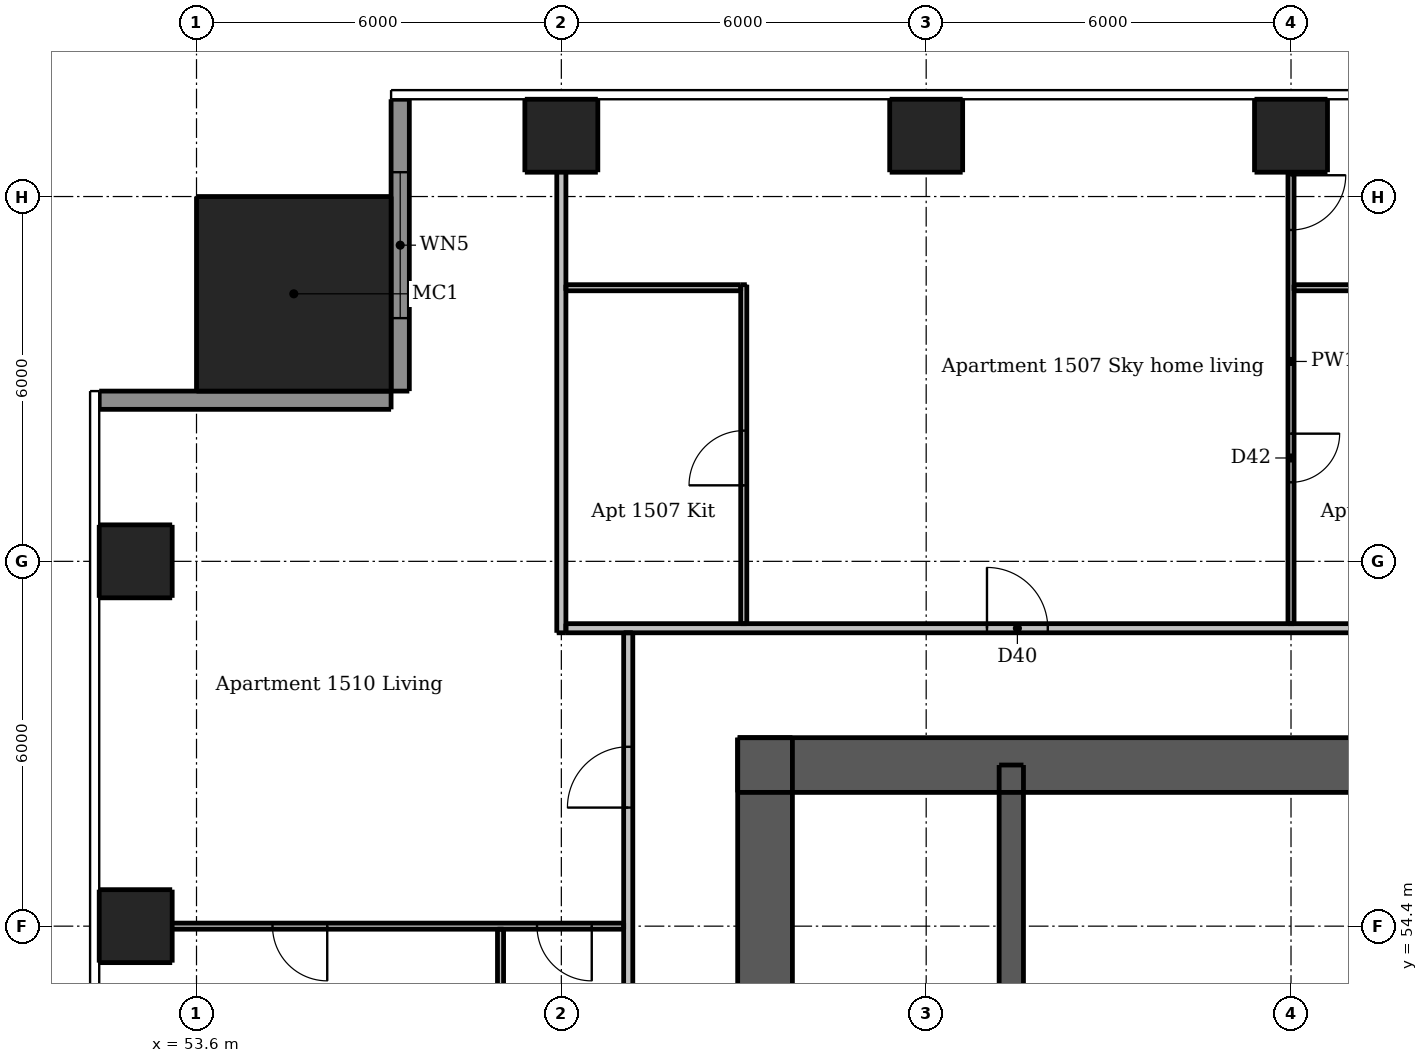
"""IFC4 building model, lengths in metres.
Left out: names, types, materials, properties, quantities, classifications, styles, units other than length and angle.
Written with IfcOpenShell. Run it as: python <this file> out.ifc"""

import sys

from ifc_helpers import new_model, si_unit, direction, frame, frame_2d, origin, origin_2d, place, context, subcontext, project, spatial, rectangle, extrude, element, fill, save


model = new_model("IFC4")
c1 = context("Model", 3, precision=1e-05, world=origin(), true_north=direction((0.0, 1.0)))
c2 = subcontext(c1, "Body", "Model", "MODEL_VIEW")
j1 = project(units=[si_unit("LENGTHUNIT", "METRE"), si_unit("PLANEANGLEUNIT", "RADIAN")], contexts=[c1])
p1 = place(None, origin())
s1 = spatial("IfcSite", under=j1, at=p1, CompositionType="ELEMENT")
p2 = place(p1, origin())
s2 = spatial("IfcBuilding", under=s1, at=p2, CompositionType="ELEMENT")
p3 = place(p2, frame((0.0, 0.0, 56.5)))
s3 = spatial("IfcBuildingStorey", under=s2, at=p3, CompositionType="ELEMENT", Elevation=56.5)
p4 = place(p3, frame((62.5, 57.05, 0.0), z_axis=(0.0, 0.0, 1.0), x_axis=(1.0, 0.0, 0.0)))
e1 = element("IfcWall", 1, at=p4, inside=s3, PredefinedType="SHEAR", context=c2, shape_type="SweptSolid", body=[
    extrude(rectangle(XDim=24.0, YDim=0.9, at=frame_2d((12.0, 0.0))), origin(), (0.0, 0.0, 1.0), 3.05),
])
p5 = place(p4, frame((20.85, 0.0, 0.0)))
e2 = element("IfcOpeningElement", 2, at=p5, cuts=e1, PredefinedType="OPENING", context=c2, shape_type="SweptSolid", body=[
    extrude(rectangle(XDim=1.1, YDim=2.1, at=frame_2d((0.55, 1.05))), frame((0.0, 0.46, 0.0), z_axis=(0.0, -1.0, 0.0), x_axis=(1.0, 0.0, 0.0)), (0.0, 0.0, 1.0), 0.92),
])
p6 = place(p4, frame((2.05, 0.0, 0.0)))
e3 = element("IfcOpeningElement", 3, at=p6, cuts=e1, PredefinedType="OPENING", context=c2, shape_type="SweptSolid", body=[
    extrude(rectangle(XDim=1.1, YDim=2.1, at=frame_2d((0.55, 1.05))), frame((0.0, 0.46, 0.0), z_axis=(0.0, -1.0, 0.0), x_axis=(1.0, 0.0, 0.0)), (0.0, 0.0, 1.0), 0.92),
])
p7 = place(p4, frame((11.55, 0.0, 0.0)))
e4 = element("IfcOpeningElement", 4, at=p7, cuts=e1, PredefinedType="OPENING", context=c2, shape_type="SweptSolid", body=[
    extrude(rectangle(XDim=0.9, YDim=2.1, at=frame_2d((0.45, 1.05))), frame((0.0, 0.46, 0.0), z_axis=(0.0, -1.0, 0.0), x_axis=(1.0, 0.0, 0.0)), (0.0, 0.0, 1.0), 0.92),
])
p8 = place(p3, frame((62.95, 33.5, 0.0), z_axis=(0.0, 0.0, 1.0), x_axis=(0.0, 1.0, 0.0)))
e5 = element("IfcWall", 5, at=p8, inside=s3, PredefinedType="SHEAR", context=c2, shape_type="SweptSolid", body=[
    extrude(rectangle(XDim=24.0, YDim=0.9, at=frame_2d((12.0, 0.0))), origin(), (0.0, 0.0, 1.0), 3.05),
])
p9 = place(p8, frame((11.2, 0.0, 0.0)))
e6 = element("IfcOpeningElement", 6, at=p9, cuts=e5, PredefinedType="OPENING", context=c2, shape_type="SweptSolid", body=[
    extrude(rectangle(XDim=1.6, YDim=2.1, at=frame_2d((0.8, 1.05))), frame((0.0, 0.46, 0.0), z_axis=(0.0, -1.0, 0.0), x_axis=(1.0, 0.0, 0.0)), (0.0, 0.0, 1.0), 0.92),
])
p10 = place(p3, frame((67.0, 47.1, 0.0), z_axis=(0.0, 0.0, 1.0), x_axis=(0.0, 1.0, 0.0)))
e7 = element("IfcWall", 7, at=p10, inside=s3, PredefinedType="SHEAR", context=c2, shape_type="SweptSolid", body=[
    extrude(rectangle(XDim=9.95, YDim=0.4, at=frame_2d((4.975, 0.0))), origin(), (0.0, 0.0, 1.0), 3.05),
])
for number, where, z_axis, x_axis in (
    (8, (59.6, 67.4, 0.0), (0.0, 0.0, 1.0), (1.0, 0.0, 0.0)),
    (9, (65.6, 67.4, 0.0), (0.0, 0.0, 1.0), (1.0, 0.0, 0.0)),
    (10, (71.6, 67.4, 0.0), (0.0, 0.0, 1.0), (1.0, 0.0, 0.0)),
    (11, (52.6, 54.4, 0.0), (0.0, 0.0, 1.0), (1.0, 0.0, 0.0)),
    (12, (52.6, 60.4, 0.0), (0.0, 0.0, 1.0), (1.0, 0.0, 0.0)),
):
    element("IfcColumn", number, at=place(p3, frame(where, z_axis=z_axis, x_axis=x_axis)), inside=s3, PredefinedType="COLUMN", context=c2, shape_type="SweptSolid", body=[
        extrude(rectangle(XDim=1.2, YDim=1.2, at=origin_2d()), origin(), (0.0, 0.0, 1.0), 3.05),
    ])
p11 = place(p3, frame((55.2, 64.8, 0.0), z_axis=(0.0, 0.0, 1.0), x_axis=(1.0, 0.0, 0.0)))
e13 = element("IfcColumn", 13, at=p11, inside=s3, PredefinedType="COLUMN", context=c2, shape_type="SweptSolid", body=[
    extrude(rectangle(XDim=3.2, YDim=3.2, at=origin_2d()), origin(), (0.0, 0.0, 1.0), 3.3),
])
p12 = place(p3, frame((56.95, 68.0, 0.0), z_axis=(0.0, 0.0, 1.0), x_axis=(0.0, -1.0, 0.0)))
e14 = element("IfcWall", 14, at=p12, inside=s3, PredefinedType="SOLIDWALL", context=c2, shape_type="SweptSolid", body=[
    extrude(rectangle(XDim=4.8, YDim=0.3, at=frame_2d((2.4, 0.0))), origin(), (0.0, 0.0, 1.0), 3.05),
])
p13 = place(p12, frame((1.2, 0.0, 0.15)))
e15 = element("IfcOpeningElement", 15, at=p13, cuts=e14, PredefinedType="OPENING", context=c2, shape_type="SweptSolid", body=[
    extrude(rectangle(XDim=2.4, YDim=2.1, at=frame_2d((1.2, 1.05))), frame((0.0, 0.16, 0.0), z_axis=(0.0, -1.0, 0.0), x_axis=(1.0, 0.0, 0.0)), (0.0, 0.0, 1.0), 0.32),
])
p14 = place(p3, frame((56.8, 63.05, 0.0), z_axis=(0.0, 0.0, 1.0), x_axis=(-1.0, 0.0, 0.0)))
e16 = element("IfcWall", 16, at=p14, inside=s3, PredefinedType="SOLIDWALL", context=c2, shape_type="SweptSolid", body=[
    extrude(rectangle(XDim=4.8, YDim=0.3, at=frame_2d((2.4, 0.0))), origin(), (0.0, 0.0, 1.0), 3.05),
])
p15 = place(p3, frame((58.6, 54.35, 0.0), z_axis=(0.0, 0.0, 1.0), x_axis=(0.0, -1.0, 0.0)))
e17 = element("IfcWall", 17, at=p15, inside=s3, PredefinedType="PARTITIONING", context=c2, shape_type="SweptSolid", body=[
    extrude(rectangle(XDim=5.875, YDim=0.1, at=frame_2d((2.938, 0.0))), origin(), (0.0, 0.0, 1.0), 3.05),
])
p16 = place(p15, frame((3.75, 0.0, 0.0)))
e18 = element("IfcOpeningElement", 18, at=p16, cuts=e17, PredefinedType="OPENING", context=c2, shape_type="SweptSolid", body=[
    extrude(rectangle(XDim=0.8, YDim=2.1, at=frame_2d((0.4, 1.05))), frame((0.0, 0.06, 0.0), z_axis=(0.0, -1.0, 0.0), x_axis=(1.0, 0.0, 0.0)), (0.0, 0.0, 1.0), 0.12),
])
p17 = place(p3, frame((62.6, 59.375, 0.0), z_axis=(0.0, 0.0, 1.0), x_axis=(0.0, 1.0, 0.0)))
e19 = element("IfcWall", 19, at=p17, inside=s3, PredefinedType="PARTITIONING", context=c2, shape_type="SweptSolid", body=[
    extrude(rectangle(XDim=5.575, YDim=0.1, at=frame_2d((2.788, 0.0))), origin(), (0.0, 0.0, 1.0), 3.05),
])
p18 = place(p17, frame((2.275, 0.0, 0.0)))
e20 = element("IfcOpeningElement", 20, at=p18, cuts=e19, PredefinedType="OPENING", context=c2, shape_type="SweptSolid", body=[
    extrude(rectangle(XDim=0.9, YDim=2.1, at=frame_2d((0.45, 1.05))), frame((0.0, 0.06, 0.0), z_axis=(0.0, -1.0, 0.0), x_axis=(1.0, 0.0, 0.0)), (0.0, 0.0, 1.0), 0.12),
])
p19 = place(p3, frame((71.6, 68.0, 0.0), z_axis=(0.0, 0.0, 1.0), x_axis=(0.0, -1.0, 0.0)))
e21 = element("IfcWall", 21, at=p19, inside=s3, PredefinedType="PARTITIONING", context=c2, shape_type="SweptSolid", body=[
    extrude(rectangle(XDim=8.625, YDim=0.1, at=frame_2d((4.312, 0.0))), origin(), (0.0, 0.0, 1.0), 2.516),
])
p20 = place(p19, frame((1.25, 0.0, 0.0)))
e22 = element("IfcOpeningElement", 22, at=p20, cuts=e21, PredefinedType="OPENING", context=c2, shape_type="SweptSolid", body=[
    extrude(rectangle(XDim=0.9, YDim=2.1, at=frame_2d((0.45, 1.05))), frame((0.0, 0.06, 0.0), z_axis=(0.0, -1.0, 0.0), x_axis=(1.0, 0.0, 0.0)), (0.0, 0.0, 1.0), 0.12),
])
p21 = place(p19, frame((5.5, 0.0, 0.0)))
e23 = element("IfcOpeningElement", 23, at=p21, cuts=e21, PredefinedType="OPENING", context=c2, shape_type="SweptSolid", body=[
    extrude(rectangle(XDim=0.8, YDim=2.1, at=frame_2d((0.4, 1.05))), frame((0.0, 0.06, 0.0), z_axis=(0.0, -1.0, 0.0), x_axis=(1.0, 0.0, 0.0)), (0.0, 0.0, 1.0), 0.12),
])
p22 = place(p3, frame((59.675, 64.9, 0.0), z_axis=(0.0, 0.0, 1.0), x_axis=(1.0, 0.0, 0.0)))
e24 = element("IfcWall", 24, at=p22, inside=s3, PredefinedType="PARTITIONING", context=c2, shape_type="SweptSolid", body=[
    extrude(rectangle(XDim=2.875, YDim=0.1, at=frame_2d((1.438, 0.0))), origin(), (0.0, 0.0, 1.0), 3.05),
])
p23 = place(p3, frame((71.65, 64.9, 0.0), z_axis=(0.0, 0.0, 1.0), x_axis=(1.0, 0.0, 0.0)))
e25 = element("IfcWall", 25, at=p23, inside=s3, PredefinedType="PARTITIONING", context=c2, shape_type="SweptSolid", body=[
    extrude(rectangle(XDim=3.5, YDim=0.1, at=frame_2d((1.75, 0.0))), origin(), (0.0, 0.0, 1.0), 3.05),
])
p24 = place(p3, frame((60.625, 54.4, 0.0), z_axis=(0.0, 0.0, 1.0), x_axis=(-1.0, 0.0, 0.0)))
e26 = element("IfcWall", 26, at=p24, inside=s3, PredefinedType="PARTITIONING", context=c2, shape_type="SweptSolid", body=[
    extrude(rectangle(XDim=8.625, YDim=0.1, at=frame_2d((4.312, 0.0))), origin(), (0.0, 0.0, 1.0), 2.516),
])
p25 = place(p24, frame((0.525, 0.0, 0.0)))
e27 = element("IfcOpeningElement", 27, at=p25, cuts=e26, PredefinedType="OPENING", context=c2, shape_type="SweptSolid", body=[
    extrude(rectangle(XDim=0.9, YDim=2.1, at=frame_2d((0.45, 1.05))), frame((0.0, 0.06, 0.0), z_axis=(0.0, -1.0, 0.0), x_axis=(1.0, 0.0, 0.0)), (0.0, 0.0, 1.0), 0.12),
])
p26 = place(p24, frame((4.875, 0.0, 0.0)))
e28 = element("IfcOpeningElement", 28, at=p26, cuts=e26, PredefinedType="OPENING", context=c2, shape_type="SweptSolid", body=[
    extrude(rectangle(XDim=0.9, YDim=2.1, at=frame_2d((0.45, 1.05))), frame((0.0, 0.06, 0.0), z_axis=(0.0, -1.0, 0.0), x_axis=(1.0, 0.0, 0.0)), (0.0, 0.0, 1.0), 0.12),
])
p27 = place(p3, frame((59.6, 59.225, 0.0), z_axis=(0.0, 0.0, 1.0), x_axis=(0.0, 1.0, 0.0)))
e29 = element("IfcWall", 29, at=p27, inside=s3, PredefinedType="PARTITIONING", context=c2, shape_type="SweptSolid", body=[
    extrude(rectangle(XDim=8.775, YDim=0.15, at=frame_2d((4.387, 0.0))), origin(), (0.0, 0.0, 1.0), 2.51),
])
p28 = place(p3, frame((60.7, 30.325, 0.0), z_axis=(0.0, 0.0, 1.0), x_axis=(0.0, 1.0, 0.0)))
e30 = element("IfcWall", 30, at=p28, inside=s3, PredefinedType="PARTITIONING", context=c2, shape_type="SweptSolid", body=[
    extrude(rectangle(XDim=28.9, YDim=0.15, at=frame_2d((14.45, 0.0))), origin(), (0.0, 0.0, 1.0), 3.05),
])
p29 = place(p28, frame((9.225, 0.0, 0.0)))
e31 = element("IfcOpeningElement", 31, at=p29, cuts=e30, PredefinedType="OPENING", context=c2, shape_type="SweptSolid", body=[
    extrude(rectangle(XDim=1.0, YDim=2.1, at=frame_2d((0.5, 1.05))), frame((0.0, 0.085, 0.0), z_axis=(0.0, -1.0, 0.0), x_axis=(1.0, 0.0, 0.0)), (0.0, 0.0, 1.0), 0.17),
])
p30 = place(p28, frame((26.025, 0.0, 0.0)))
e32 = element("IfcOpeningElement", 32, at=p30, cuts=e30, PredefinedType="OPENING", context=c2, shape_type="SweptSolid", body=[
    extrude(rectangle(XDim=1.0, YDim=2.1, at=frame_2d((0.5, 1.05))), frame((0.0, 0.085, 0.0), z_axis=(0.0, -1.0, 0.0), x_axis=(1.0, 0.0, 0.0)), (0.0, 0.0, 1.0), 0.17),
])
p31 = place(p3, frame((59.675, 59.3, 0.0), z_axis=(0.0, 0.0, 1.0), x_axis=(1.0, 0.0, 0.0)))
e33 = element("IfcWall", 33, at=p31, inside=s3, PredefinedType="PARTITIONING", context=c2, shape_type="SweptSolid", body=[
    extrude(rectangle(XDim=28.55, YDim=0.15, at=frame_2d((14.275, 0.0))), origin(), (0.0, 0.0, 1.0), 3.05),
])
p32 = place(p31, frame((6.925, 0.0, 0.0)))
e34 = element("IfcOpeningElement", 34, at=p32, cuts=e33, PredefinedType="OPENING", context=c2, shape_type="SweptSolid", body=[
    extrude(rectangle(XDim=1.0, YDim=2.1, at=frame_2d((0.5, 1.05))), frame((0.0, 0.085, 0.0), z_axis=(0.0, -1.0, 0.0), x_axis=(1.0, 0.0, 0.0)), (0.0, 0.0, 1.0), 0.17),
])
p33 = place(p31, frame((25.775, 0.0, 0.0)))
e35 = element("IfcOpeningElement", 35, at=p33, cuts=e33, PredefinedType="OPENING", context=c2, shape_type="SweptSolid", body=[
    extrude(rectangle(XDim=1.0, YDim=2.1, at=frame_2d((0.5, 1.05))), frame((0.0, 0.085, 0.0), z_axis=(0.0, -1.0, 0.0), x_axis=(1.0, 0.0, 0.0)), (0.0, 0.0, 1.0), 0.17),
])
p34 = place(p13, origin())
e36 = element("IfcWindow", 36, at=p34, inside=s3, PartitioningType="DOUBLE_PANEL_VERTICAL", PredefinedType="WINDOW", context=c2, shape_type="SweptSolid", body=[
    extrude(rectangle(XDim=2.4, YDim=2.1, at=frame_2d((1.2, 1.05))), frame((0.0, 0.03, 0.0), z_axis=(0.0, -1.0, 0.0), x_axis=(1.0, 0.0, 0.0)), (0.0, 0.0, 1.0), 0.06),
])
fill(e15, e36)
p35 = place(p6, origin())
e37 = element("IfcDoor", 37, at=p35, inside=s3, OperationType="SINGLE_SWING_LEFT", PredefinedType="DOOR", context=c2, shape_type="SweptSolid", body=[
    extrude(rectangle(XDim=1.1, YDim=2.1, at=frame_2d((0.55, 1.05))), frame((0.0, -0.388, 0.0), z_axis=(0.0, -1.0, 0.0), x_axis=(1.0, 0.0, 0.0)), (0.0, 0.0, 1.0), 0.05),
])
fill(e3, e37)
p36 = place(p32, origin())
e38 = element("IfcDoor", 38, at=p36, inside=s3, OperationType="SINGLE_SWING_LEFT", PredefinedType="DOOR", context=c2, shape_type="SweptSolid", body=[
    extrude(rectangle(XDim=1.0, YDim=2.1, at=frame_2d((0.5, 1.05))), frame((0.0, 0.025, 0.0), z_axis=(0.0, -1.0, 0.0), x_axis=(1.0, 0.0, 0.0)), (0.0, 0.0, 1.0), 0.05),
])
fill(e34, e38)
p37 = place(p18, origin())
e39 = element("IfcDoor", 39, at=p37, inside=s3, OperationType="SINGLE_SWING_LEFT", PredefinedType="DOOR", context=c2, shape_type="SweptSolid", body=[
    extrude(rectangle(XDim=0.9, YDim=2.1, at=frame_2d((0.45, 1.05))), frame((0.0, 0.025, 0.0), z_axis=(0.0, -1.0, 0.0), x_axis=(1.0, 0.0, 0.0)), (0.0, 0.0, 1.0), 0.05),
])
fill(e20, e39)
p38 = place(p20, origin())
e40 = element("IfcDoor", 40, at=p38, inside=s3, OperationType="SINGLE_SWING_LEFT", PredefinedType="DOOR", context=c2, shape_type="SweptSolid", body=[
    extrude(rectangle(XDim=0.9, YDim=2.1, at=frame_2d((0.45, 1.05))), frame((0.0, 0.025, 0.0), z_axis=(0.0, -1.0, 0.0), x_axis=(1.0, 0.0, 0.0)), (0.0, 0.0, 1.0), 0.05),
])
fill(e22, e40)
p39 = place(p21, origin())
e41 = element("IfcDoor", 41, at=p39, inside=s3, OperationType="SINGLE_SWING_LEFT", PredefinedType="DOOR", context=c2, shape_type="SweptSolid", body=[
    extrude(rectangle(XDim=0.8, YDim=2.1, at=frame_2d((0.4, 1.05))), frame((0.0, 0.025, 0.0), z_axis=(0.0, -1.0, 0.0), x_axis=(1.0, 0.0, 0.0)), (0.0, 0.0, 1.0), 0.05),
])
fill(e23, e41)
p40 = place(p30, origin())
e42 = element("IfcDoor", 42, at=p40, inside=s3, OperationType="SINGLE_SWING_LEFT", PredefinedType="DOOR", context=c2, shape_type="SweptSolid", body=[
    extrude(rectangle(XDim=1.0, YDim=2.1, at=frame_2d((0.5, 1.05))), frame((0.0, 0.025, 0.0), z_axis=(0.0, -1.0, 0.0), x_axis=(1.0, 0.0, 0.0)), (0.0, 0.0, 1.0), 0.05),
])
fill(e32, e42)
p41 = place(p25, origin())
e43 = element("IfcDoor", 43, at=p41, inside=s3, OperationType="SINGLE_SWING_LEFT", PredefinedType="DOOR", context=c2, shape_type="SweptSolid", body=[
    extrude(rectangle(XDim=0.9, YDim=2.1, at=frame_2d((0.45, 1.05))), frame((0.0, 0.025, 0.0), z_axis=(0.0, -1.0, 0.0), x_axis=(1.0, 0.0, 0.0)), (0.0, 0.0, 1.0), 0.05),
])
fill(e27, e43)
p42 = place(p26, origin())
e44 = element("IfcDoor", 44, at=p42, inside=s3, OperationType="SINGLE_SWING_LEFT", PredefinedType="DOOR", context=c2, shape_type="SweptSolid", body=[
    extrude(rectangle(XDim=0.9, YDim=2.1, at=frame_2d((0.45, 1.05))), frame((0.0, 0.025, 0.0), z_axis=(0.0, -1.0, 0.0), x_axis=(1.0, 0.0, 0.0)), (0.0, 0.0, 1.0), 0.05),
])
fill(e28, e44)
save(model, sys.argv[1])
